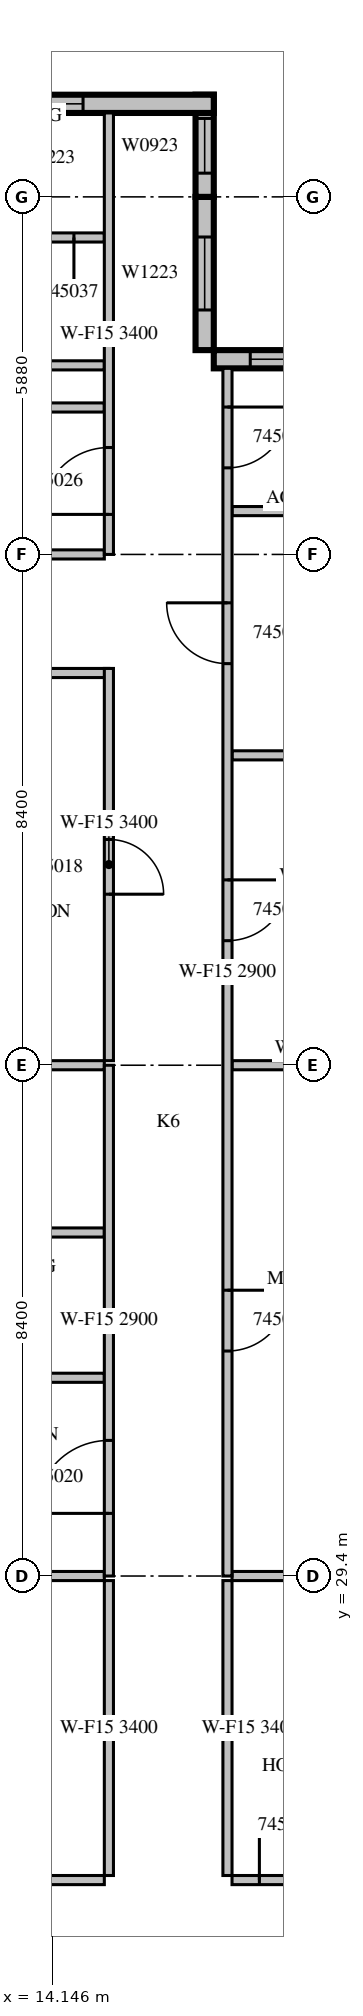
"""IFC4 building model, lengths in metres.
Left out: names, types, materials, properties, quantities, classifications, styles, units other than length and angle.
Written with IfcOpenShell. Run it as: python <this file> out.ifc"""

import sys

from ifc_helpers import new_model, si_unit, direction, frame, frame_2d, origin, place, context, subcontext, project, spatial, rectangle, extrude, source, transform, mapped, element, fill, save


model = new_model("IFC4")
c1 = context("Model", 3, precision=1e-05, world=origin(), true_north=direction((0.0, 1.0)))
c2 = subcontext(c1, "Body", "Model", "MODEL_VIEW")
j1 = project(units=[si_unit("LENGTHUNIT", "METRE"), si_unit("PLANEANGLEUNIT", "RADIAN")], contexts=[c1])
p1 = place(None, origin())
s1 = spatial("IfcSite", under=j1, at=p1, CompositionType="ELEMENT")
p2 = place(p1, origin())
s2 = spatial("IfcBuilding", under=s1, at=p2, CompositionType="ELEMENT")
p3 = place(p2, frame((0.0, 0.0, 204.4)))
s3 = spatial("IfcBuildingStorey", under=s2, at=p3, CompositionType="ELEMENT", Elevation=204.4)
m1 = source(origin(), c2, "Body", "SweptSolid", [
    extrude(rectangle(XDim=4.2, YDim=0.3, at=frame_2d((2.1, 0.0))), origin(), (0.0, 0.0, 1.0), 3.4),
])
p4 = place(p3, frame((21.0, 49.41, 0.0), z_axis=(0.0, 0.0, 1.0), x_axis=(-1.0, 0.0, 0.0)))
e1 = element("IfcWall", 1, at=p4, inside=s3, PredefinedType="STANDARD", context=c2, shape_type="MappedRepresentation", body=[
    mapped(m1, transform((0.0, 0.0, 0.0), scale=1.0)),
])
m2 = source(origin(), c2, "Body", "SweptSolid", [
    extrude(rectangle(XDim=3.0, YDim=2.3, at=frame_2d((1.5, 1.15))), frame((0.0, 0.16, 0.0), z_axis=(0.0, -1.0, 0.0), x_axis=(1.0, 0.0, 0.0)), (0.0, 0.0, 1.0), 0.32),
])
p5 = place(p4, frame((0.6, 0.0, 0.6)))
e2 = element("IfcOpeningElement", 2, at=p5, cuts=e1, PredefinedType="OPENING", context=c2, shape_type="MappedRepresentation", body=[
    mapped(m2, transform((0.0, 0.0, 0.0), scale=1.0)),
])
m3 = source(origin(), c2, "Body", "SweptSolid", [
    extrude(rectangle(XDim=2.52, YDim=0.3, at=frame_2d((1.26, 0.0))), origin(), (0.0, 0.0, 1.0), 3.4),
])
p6 = place(p3, frame((16.65, 49.56, 0.0), z_axis=(0.0, 0.0, 1.0), x_axis=(0.0, 1.0, 0.0)))
e3 = element("IfcWall", 3, at=p6, inside=s3, PredefinedType="STANDARD", context=c2, shape_type="MappedRepresentation", body=[
    mapped(m3, transform((0.0, 0.0, 0.0), scale=1.0)),
])
m4 = source(origin(), c2, "Body", "SweptSolid", [
    extrude(rectangle(XDim=1.2, YDim=2.3, at=frame_2d((0.6, 1.15))), frame((0.0, 0.16, 0.0), z_axis=(0.0, -1.0, 0.0), x_axis=(1.0, 0.0, 0.0)), (0.0, 0.0, 1.0), 0.32),
])
p7 = place(p6, frame((0.66, 0.0, 0.6)))
e4 = element("IfcOpeningElement", 4, at=p7, cuts=e3, PredefinedType="OPENING", context=c2, shape_type="MappedRepresentation", body=[
    mapped(m4, transform((0.0, 0.0, 0.0), scale=1.0)),
])
m5 = source(origin(), c2, "Body", "SweptSolid", [
    extrude(rectangle(XDim=1.68, YDim=0.3, at=frame_2d((0.84, 0.0))), origin(), (0.0, 0.0, 1.0), 3.4),
])
p8 = place(p3, frame((16.65, 52.08, 0.0), z_axis=(0.0, 0.0, 1.0), x_axis=(0.0, 1.0, 0.0)))
e5 = element("IfcWall", 5, at=p8, inside=s3, PredefinedType="STANDARD", context=c2, shape_type="MappedRepresentation", body=[
    mapped(m5, transform((0.0, 0.0, 0.0), scale=1.0)),
])
m6 = source(origin(), c2, "Body", "SweptSolid", [
    extrude(rectangle(XDim=0.9, YDim=2.3, at=frame_2d((0.45, 1.15))), frame((0.0, 0.16, 0.0), z_axis=(0.0, -1.0, 0.0), x_axis=(1.0, 0.0, 0.0)), (0.0, 0.0, 1.0), 0.32),
])
p9 = place(p8, frame((0.39, 0.0, 0.6)))
e6 = element("IfcOpeningElement", 6, at=p9, cuts=e5, PredefinedType="OPENING", context=c2, shape_type="MappedRepresentation", body=[
    mapped(m6, transform((0.0, 0.0, 0.0), scale=1.0)),
])
m7 = source(origin(), c2, "Body", "SweptSolid", [
    extrude(rectangle(XDim=10.5, YDim=0.3, at=frame_2d((5.25, 0.0))), origin(), (0.0, 0.0, 1.0), 3.4),
])
p10 = place(p3, frame((16.8, 53.61, 0.0), z_axis=(0.0, 0.0, 1.0), x_axis=(-1.0, 0.0, 0.0)))
e7 = element("IfcWall", 7, at=p10, inside=s3, PredefinedType="STANDARD", context=c2, shape_type="MappedRepresentation", body=[
    mapped(m7, transform((0.0, 0.0, 0.0), scale=1.0)),
])
p11 = place(p10, frame((2.15, 0.0, 0.6)))
e8 = element("IfcOpeningElement", 8, at=p11, cuts=e7, PredefinedType="OPENING", context=c2, shape_type="MappedRepresentation", body=[
    mapped(m4, transform((0.0, 0.0, 0.0), scale=1.0)),
])
m8 = source(origin(), c2, "Body", "SweptSolid", [
    extrude(rectangle(XDim=1.8, YDim=2.3, at=frame_2d((0.9, 1.15))), frame((0.0, 0.16, 0.0), z_axis=(0.0, -1.0, 0.0), x_axis=(1.0, 0.0, 0.0)), (0.0, 0.0, 1.0), 0.32),
])
p12 = place(p10, frame((8.025, 0.0, 0.6)))
e9 = element("IfcOpeningElement", 9, at=p12, cuts=e7, PredefinedType="OPENING", context=c2, shape_type="MappedRepresentation", body=[
    mapped(m8, transform((0.0, 0.0, 0.0), scale=1.0)),
])
m9 = source(origin(), c2, "Body", "SweptSolid", [
    extrude(rectangle(XDim=8.495, YDim=0.15, at=frame_2d((4.247, 0.0))), origin(), (0.0, 0.0, 1.0), 3.4),
])
p13 = place(p3, frame((6.505, 24.4, 0.0), z_axis=(0.0, 0.0, 1.0), x_axis=(1.0, 0.0, 0.0)))
e10 = element("IfcWall", 10, at=p13, inside=s3, PredefinedType="PARTITIONING", context=c2, shape_type="MappedRepresentation", body=[
    mapped(m9, transform((0.0, 0.0, 0.0), scale=1.0)),
])
m10 = source(origin(), c2, "Body", "SweptSolid", [
    extrude(rectangle(XDim=0.9, YDim=2.1, at=frame_2d((0.45, 1.05))), frame((0.0, 0.085, 0.0), z_axis=(0.0, -1.0, 0.0), x_axis=(1.0, 0.0, 0.0)), (0.0, 0.0, 1.0), 0.17),
])
p14 = place(p13, frame((1.045, 0.0, 0.0)))
e11 = element("IfcOpeningElement", 11, at=p14, cuts=e10, PredefinedType="OPENING", context=c2, shape_type="MappedRepresentation", body=[
    mapped(m10, transform((0.0, 0.0, 0.0), scale=1.0)),
])
p15 = place(p13, frame((6.12, 0.0, 0.0)))
e12 = element("IfcOpeningElement", 12, at=p15, cuts=e10, PredefinedType="OPENING", context=c2, shape_type="MappedRepresentation", body=[
    mapped(m10, transform((0.0, 0.0, 0.0), scale=1.0)),
])
m11 = source(origin(), c2, "Body", "SweptSolid", [
    extrude(rectangle(XDim=3.6, YDim=0.15, at=frame_2d((1.8, 0.0))), origin(), (0.0, 0.0, 1.0), 3.4),
])
p16 = place(p3, frame((17.1, 24.4, 0.0), z_axis=(0.0, 0.0, 1.0), x_axis=(1.0, 0.0, 0.0)))
e13 = element("IfcWall", 13, at=p16, inside=s3, PredefinedType="PARTITIONING", context=c2, shape_type="MappedRepresentation", body=[
    mapped(m11, transform((0.0, 0.0, 0.0), scale=1.0)),
])
p17 = place(p16, frame((0.45, 0.0, 0.0)))
e14 = element("IfcOpeningElement", 14, at=p17, cuts=e13, PredefinedType="OPENING", context=c2, shape_type="MappedRepresentation", body=[
    mapped(m10, transform((0.0, 0.0, 0.0), scale=1.0)),
])
m12 = source(origin(), c2, "Body", "SweptSolid", [
    extrude(rectangle(XDim=4.85, YDim=0.15, at=frame_2d((2.425, 0.0))), origin(), (0.0, 0.0, 1.0), 3.4),
])
for number, where, z_axis, x_axis in (
    (15, (15.075, 24.475, 0.0), (0.0, 0.0, 1.0), (0.0, 1.0, 0.0)),
    (16, (17.025, 29.325, 0.0), (0.0, 0.0, 1.0), (0.0, -1.0, 0.0)),
):
    element("IfcWall", number, at=place(p3, frame(where, z_axis=z_axis, x_axis=x_axis)), inside=s3, PredefinedType="PARTITIONING", context=c2, shape_type="MappedRepresentation", body=[
        mapped(m12, transform((0.0, 0.0, 0.0), scale=1.0)),
    ])
m13 = source(origin(), c2, "Body", "SweptSolid", [
    extrude(rectangle(XDim=4.051, YDim=0.15, at=frame_2d((2.026, 0.0))), origin(), (0.0, 0.0, 1.0), 3.4),
])
p18 = place(p3, frame((15.0, 29.4, 0.0), z_axis=(0.0, 0.0, 1.0), x_axis=(-1.0, 0.0, 0.0)))
e17 = element("IfcWall", 17, at=p18, inside=s3, PredefinedType="PARTITIONING", context=c2, shape_type="MappedRepresentation", body=[
    mapped(m13, transform((0.0, 0.0, 0.0), scale=1.0)),
])
m14 = source(origin(), c2, "Body", "SweptSolid", [
    extrude(rectangle(XDim=3.001, YDim=0.15, at=frame_2d((1.5, 0.0))), origin(), (0.0, 0.0, 1.0), 3.4),
])
p19 = place(p3, frame((20.101, 29.4, 0.0), z_axis=(0.0, 0.0, 1.0), x_axis=(-1.0, 0.0, 0.0)))
e18 = element("IfcWall", 18, at=p19, inside=s3, PredefinedType="PARTITIONING", context=c2, shape_type="MappedRepresentation", body=[
    mapped(m14, transform((0.0, 0.0, 0.0), scale=1.0)),
])
m15 = source(origin(), c2, "Body", "SweptSolid", [
    extrude(rectangle(XDim=3.975, YDim=0.15, at=frame_2d((1.988, 0.0))), origin(), (0.0, 0.0, 1.0), 3.4),
])
p20 = place(p3, frame((15.075, 44.25, 0.0), z_axis=(0.0, 0.0, 1.0), x_axis=(-1.0, 0.0, 0.0)))
e19 = element("IfcWall", 19, at=p20, inside=s3, PredefinedType="PARTITIONING", context=c2, shape_type="MappedRepresentation", body=[
    mapped(m15, transform((0.0, 0.0, 0.0), scale=1.0)),
])
m16 = source(origin(), c2, "Body", "SweptSolid", [
    extrude(rectangle(XDim=6.45, YDim=0.15, at=frame_2d((3.225, 0.0))), origin(), (0.0, 0.0, 1.0), 3.4),
])
p21 = place(p3, frame((15.075, 37.875, 0.0), z_axis=(0.0, 0.0, 1.0), x_axis=(0.0, 1.0, 0.0)))
e20 = element("IfcWall", 20, at=p21, inside=s3, PredefinedType="PARTITIONING", context=c2, shape_type="MappedRepresentation", body=[
    mapped(m16, transform((0.0, 0.0, 0.0), scale=1.0)),
])
p22 = place(p21, frame((2.737, 0.0, 0.0)))
e21 = element("IfcOpeningElement", 21, at=p22, cuts=e20, PredefinedType="OPENING", context=c2, shape_type="MappedRepresentation", body=[
    mapped(m10, transform((0.0, 0.0, 0.0), scale=1.0)),
])
m17 = source(origin(), c2, "Body", "SweptSolid", [
    extrude(rectangle(XDim=3.9, YDim=0.15, at=frame_2d((1.95, 0.0))), origin(), (0.0, 0.0, 1.0), 3.4),
])
for number, where, z_axis, x_axis in (
    (22, (15.0, 32.66, 0.0), (0.0, 0.0, 1.0), (-1.0, 0.0, 0.0)),
    (23, (15.0, 35.049, 0.0), (0.0, 0.0, 1.0), (-1.0, 0.0, 0.0)),
    (24, (15.0, 37.8, 0.0), (0.0, 0.0, 1.0), (-1.0, 0.0, 0.0)),
    (25, (15.0, 48.617, 0.0), (0.0, 0.0, 1.0), (-1.0, 0.0, 0.0)),
    (26, (15.0, 49.309, 0.0), (0.0, 0.0, 1.0), (-1.0, 0.0, 0.0)),
):
    element("IfcWall", number, at=place(p3, frame(where, z_axis=z_axis, x_axis=x_axis)), inside=s3, PredefinedType="PARTITIONING", context=c2, shape_type="MappedRepresentation", body=[
        mapped(m17, transform((0.0, 0.0, 0.0), scale=1.0)),
    ])
p23 = place(p3, frame((15.0, 51.412, 0.0), z_axis=(0.0, 0.0, 1.0), x_axis=(-1.0, 0.0, 0.0)))
e27 = element("IfcWall", 27, at=p23, inside=s3, PredefinedType="PARTITIONING", context=c2, shape_type="MappedRepresentation", body=[
    mapped(m17, transform((0.0, 0.0, 0.0), scale=1.0)),
])
p24 = place(p23, frame((1.5, 0.0, 0.0)))
e28 = element("IfcOpeningElement", 28, at=p24, cuts=e27, PredefinedType="OPENING", context=c2, shape_type="MappedRepresentation", body=[
    mapped(m10, transform((0.0, 0.0, 0.0), scale=1.0)),
])
p25 = place(p23, frame((0.5, 0.0, 0.0)))
e29 = element("IfcOpeningElement", 29, at=p25, cuts=e27, PredefinedType="OPENING", context=c2, shape_type="MappedRepresentation", body=[
    mapped(m10, transform((0.0, 0.0, 0.0), scale=1.0)),
])
p26 = place(p23, frame((2.5, 0.0, 0.0)))
e30 = element("IfcOpeningElement", 30, at=p26, cuts=e27, PredefinedType="OPENING", context=c2, shape_type="MappedRepresentation", body=[
    mapped(m10, transform((0.0, 0.0, 0.0), scale=1.0)),
])
p27 = place(p3, frame((15.0, 46.2, 0.0), z_axis=(0.0, 0.0, 1.0), x_axis=(-1.0, 0.0, 0.0)))
e31 = element("IfcWall", 31, at=p27, inside=s3, PredefinedType="PARTITIONING", context=c2, shape_type="MappedRepresentation", body=[
    mapped(m17, transform((0.0, 0.0, 0.0), scale=1.0)),
])
for number, where, z_axis, x_axis in (
    (32, (17.1, 42.896, 0.0), (0.0, 0.0, 1.0), (1.0, 0.0, 0.0)),
    (33, (17.1, 46.913, 0.0), (0.0, 0.0, 1.0), (1.0, 0.0, 0.0)),
):
    element("IfcWall", number, at=place(p3, frame(where, z_axis=z_axis, x_axis=x_axis)), inside=s3, PredefinedType="PARTITIONING", context=c2, shape_type="MappedRepresentation", body=[
        mapped(m11, transform((0.0, 0.0, 0.0), scale=1.0)),
    ])
p28 = place(p3, frame((20.101, 37.8, 0.0), z_axis=(0.0, 0.0, 1.0), x_axis=(-1.0, 0.0, 0.0)))
e34 = element("IfcWall", 34, at=p28, inside=s3, PredefinedType="PARTITIONING", context=c2, shape_type="MappedRepresentation", body=[
    mapped(m14, transform((0.0, 0.0, 0.0), scale=1.0)),
])
m18 = source(origin(), c2, "Body", "SweptSolid", [
    extrude(rectangle(XDim=8.4, YDim=0.15, at=frame_2d((4.2, 0.0))), origin(), (0.0, 0.0, 1.0), 2.9),
])
p29 = place(p3, frame((15.075, 29.4, 0.0), z_axis=(0.0, 0.0, 1.0), x_axis=(0.0, 1.0, 0.0)))
e35 = element("IfcWall", 35, at=p29, inside=s3, PredefinedType="PARTITIONING", context=c2, shape_type="MappedRepresentation", body=[
    mapped(m18, transform((0.0, 0.0, 0.0), scale=1.0)),
])
m19 = source(origin(), c2, "Body", "SweptSolid", [
    extrude(rectangle(XDim=1.2, YDim=2.1, at=frame_2d((0.6, 1.05))), frame((0.0, 0.085, 0.0), z_axis=(0.0, -1.0, 0.0), x_axis=(1.0, 0.0, 0.0)), (0.0, 0.0, 1.0), 0.17),
])
p30 = place(p29, frame((1.03, 0.0, 0.0)))
e36 = element("IfcOpeningElement", 36, at=p30, cuts=e35, PredefinedType="OPENING", context=c2, shape_type="MappedRepresentation", body=[
    mapped(m19, transform((0.0, 0.0, 0.0), scale=1.0)),
])
m20 = source(origin(), c2, "Body", "SweptSolid", [
    extrude(rectangle(XDim=7.26, YDim=0.15, at=frame_2d((3.63, 0.0))), origin(), (0.0, 0.0, 1.0), 3.4),
])
p31 = place(p3, frame((15.075, 46.2, 0.0), z_axis=(0.0, 0.0, 1.0), x_axis=(0.0, 1.0, 0.0)))
e37 = element("IfcWall", 37, at=p31, inside=s3, PredefinedType="PARTITIONING", context=c2, shape_type="MappedRepresentation", body=[
    mapped(m20, transform((0.0, 0.0, 0.0), scale=1.0)),
])
m21 = source(origin(), c2, "Body", "SweptSolid", [
    extrude(rectangle(XDim=1.1, YDim=2.1, at=frame_2d((0.55, 1.05))), frame((0.0, 0.085, 0.0), z_axis=(0.0, -1.0, 0.0), x_axis=(1.0, 0.0, 0.0)), (0.0, 0.0, 1.0), 0.17),
])
p32 = place(p31, frame((0.658, 0.0, 0.0)))
e38 = element("IfcOpeningElement", 38, at=p32, cuts=e37, PredefinedType="OPENING", context=c2, shape_type="MappedRepresentation", body=[
    mapped(m21, transform((0.0, 0.0, 0.0), scale=1.0)),
])
m22 = source(origin(), c2, "Body", "SweptSolid", [
    extrude(rectangle(XDim=19.86, YDim=0.15, at=frame_2d((9.93, 0.0))), origin(), (0.0, 0.0, 1.0), 2.9),
])
p33 = place(p3, frame((17.025, 49.26, 0.0), z_axis=(0.0, 0.0, 1.0), x_axis=(0.0, -1.0, 0.0)))
e39 = element("IfcWall", 39, at=p33, inside=s3, PredefinedType="PARTITIONING", context=c2, shape_type="MappedRepresentation", body=[
    mapped(m22, transform((0.0, 0.0, 0.0), scale=1.0)),
])
m23 = source(origin(), c2, "Body", "SweptSolid", [
    extrude(rectangle(XDim=1.0, YDim=2.1, at=frame_2d((0.5, 1.05))), frame((0.0, 0.085, 0.0), z_axis=(0.0, -1.0, 0.0), x_axis=(1.0, 0.0, 0.0)), (0.0, 0.0, 1.0), 0.17),
])
p34 = place(p33, frame((15.16, 0.0, 0.0)))
e40 = element("IfcOpeningElement", 40, at=p34, cuts=e39, PredefinedType="OPENING", context=c2, shape_type="MappedRepresentation", body=[
    mapped(m23, transform((0.0, 0.0, 0.0), scale=1.0)),
])
p35 = place(p33, frame((8.412, 0.0, 0.0)))
e41 = element("IfcOpeningElement", 41, at=p35, cuts=e39, PredefinedType="OPENING", context=c2, shape_type="MappedRepresentation", body=[
    mapped(m23, transform((0.0, 0.0, 0.0), scale=1.0)),
])
p36 = place(p33, frame((3.856, 0.0, 0.0)))
e42 = element("IfcOpeningElement", 42, at=p36, cuts=e39, PredefinedType="OPENING", context=c2, shape_type="MappedRepresentation", body=[
    mapped(m23, transform((0.0, 0.0, 0.0), scale=1.0)),
])
p37 = place(p33, frame((0.636, 0.0, 0.0)))
e43 = element("IfcOpeningElement", 43, at=p37, cuts=e39, PredefinedType="OPENING", context=c2, shape_type="MappedRepresentation", body=[
    mapped(m23, transform((0.0, 0.0, 0.0), scale=1.0)),
])
m24 = source(origin(), c2, "Body", "SweptSolid", [
    extrude(rectangle(XDim=3.0, YDim=2.3, at=frame_2d((1.5, 1.15))), frame((0.0, 0.03, 0.0), z_axis=(0.0, -1.0, 0.0), x_axis=(1.0, 0.0, 0.0)), (0.0, 0.0, 1.0), 0.06),
])
p38 = place(p5, origin())
e44 = element("IfcWindow", 44, at=p38, inside=s3, PartitioningType="SINGLE_PANEL", PredefinedType="WINDOW", context=c2, shape_type="MappedRepresentation", body=[
    mapped(m24, transform((0.0, 0.0, 0.0), scale=1.0)),
])
fill(e2, e44)
m25 = source(origin(), c2, "Body", "SweptSolid", [
    extrude(rectangle(XDim=1.2, YDim=2.3, at=frame_2d((0.6, 1.15))), frame((0.0, 0.03, 0.0), z_axis=(0.0, -1.0, 0.0), x_axis=(1.0, 0.0, 0.0)), (0.0, 0.0, 1.0), 0.06),
])
p39 = place(p7, origin())
e45 = element("IfcWindow", 45, at=p39, inside=s3, PartitioningType="SINGLE_PANEL", PredefinedType="WINDOW", context=c2, shape_type="MappedRepresentation", body=[
    mapped(m25, transform((0.0, 0.0, 0.0), scale=1.0)),
])
fill(e4, e45)
m26 = source(origin(), c2, "Body", "SweptSolid", [
    extrude(rectangle(XDim=0.9, YDim=2.3, at=frame_2d((0.45, 1.15))), frame((0.0, 0.03, 0.0), z_axis=(0.0, -1.0, 0.0), x_axis=(1.0, 0.0, 0.0)), (0.0, 0.0, 1.0), 0.06),
])
p40 = place(p9, origin())
e46 = element("IfcWindow", 46, at=p40, inside=s3, PartitioningType="SINGLE_PANEL", PredefinedType="WINDOW", context=c2, shape_type="MappedRepresentation", body=[
    mapped(m26, transform((0.0, 0.0, 0.0), scale=1.0)),
])
fill(e6, e46)
p41 = place(p11, origin())
e47 = element("IfcWindow", 47, at=p41, inside=s3, PartitioningType="SINGLE_PANEL", PredefinedType="WINDOW", context=c2, shape_type="MappedRepresentation", body=[
    mapped(m25, transform((0.0, 0.0, 0.0), scale=1.0)),
])
fill(e8, e47)
m27 = source(origin(), c2, "Body", "SweptSolid", [
    extrude(rectangle(XDim=0.9, YDim=2.1, at=frame_2d((0.45, 1.05))), frame((0.0, 0.025, 0.0), z_axis=(0.0, -1.0, 0.0), x_axis=(1.0, 0.0, 0.0)), (0.0, 0.0, 1.0), 0.05),
])
p42 = place(p17, origin())
e48 = element("IfcDoor", 48, at=p42, inside=s3, OperationType="SINGLE_SWING_LEFT", PredefinedType="DOOR", context=c2, shape_type="MappedRepresentation", body=[
    mapped(m27, transform((0.0, 0.0, 0.0), scale=1.0)),
])
fill(e14, e48)
p43 = place(p22, origin())
e49 = element("IfcDoor", 49, at=p43, inside=s3, OperationType="SINGLE_SWING_RIGHT", PredefinedType="DOOR", context=c2, shape_type="MappedRepresentation", body=[
    mapped(m27, transform((0.0, 0.0, 0.0), scale=1.0)),
])
fill(e21, e49)
m28 = source(origin(), c2, "Body", "SweptSolid", [
    extrude(rectangle(XDim=1.2, YDim=2.1, at=frame_2d((0.6, 1.05))), frame((0.0, 0.025, 0.0), z_axis=(0.0, -1.0, 0.0), x_axis=(1.0, 0.0, 0.0)), (0.0, 0.0, 1.0), 0.05),
])
p44 = place(p30, origin())
e50 = element("IfcDoor", 50, at=p44, inside=s3, OperationType="SINGLE_SWING_LEFT", PredefinedType="DOOR", context=c2, shape_type="MappedRepresentation", body=[
    mapped(m28, transform((0.0, 0.0, 0.0), scale=1.0)),
])
fill(e36, e50)
m29 = source(origin(), c2, "Body", "SweptSolid", [
    extrude(rectangle(XDim=1.1, YDim=2.1, at=frame_2d((0.55, 1.05))), frame((0.0, 0.025, 0.0), z_axis=(0.0, -1.0, 0.0), x_axis=(1.0, 0.0, 0.0)), (0.0, 0.0, 1.0), 0.05),
])
p45 = place(p32, origin())
e51 = element("IfcDoor", 51, at=p45, inside=s3, OperationType="SINGLE_SWING_LEFT", PredefinedType="DOOR", context=c2, shape_type="MappedRepresentation", body=[
    mapped(m29, transform((0.0, 0.0, 0.0), scale=1.0)),
])
fill(e38, e51)
m30 = source(origin(), c2, "Body", "SweptSolid", [
    extrude(rectangle(XDim=1.0, YDim=2.1, at=frame_2d((0.5, 1.05))), frame((0.0, 0.025, 0.0), z_axis=(0.0, -1.0, 0.0), x_axis=(1.0, 0.0, 0.0)), (0.0, 0.0, 1.0), 0.05),
])
p46 = place(p34, origin())
e52 = element("IfcDoor", 52, at=p46, inside=s3, OperationType="SINGLE_SWING_LEFT", PredefinedType="DOOR", context=c2, shape_type="MappedRepresentation", body=[
    mapped(m30, transform((0.0, 0.0, 0.0), scale=1.0)),
])
fill(e40, e52)
p47 = place(p35, origin())
e53 = element("IfcDoor", 53, at=p47, inside=s3, OperationType="SINGLE_SWING_LEFT", PredefinedType="DOOR", context=c2, shape_type="MappedRepresentation", body=[
    mapped(m30, transform((0.0, 0.0, 0.0), scale=1.0)),
])
fill(e41, e53)
p48 = place(p36, origin())
e54 = element("IfcDoor", 54, at=p48, inside=s3, OperationType="SINGLE_SWING_RIGHT", PredefinedType="DOOR", context=c2, shape_type="MappedRepresentation", body=[
    mapped(m30, transform((0.0, 0.0, 0.0), scale=1.0)),
])
fill(e42, e54)
p49 = place(p37, origin())
e55 = element("IfcDoor", 55, at=p49, inside=s3, OperationType="SINGLE_SWING_LEFT", PredefinedType="DOOR", context=c2, shape_type="MappedRepresentation", body=[
    mapped(m30, transform((0.0, 0.0, 0.0), scale=1.0)),
])
fill(e43, e55)
p50 = place(p25, origin())
e56 = element("IfcDoor", 56, at=p50, inside=s3, OperationType="SINGLE_SWING_LEFT", PredefinedType="DOOR", context=c2, shape_type="MappedRepresentation", body=[
    mapped(m27, transform((0.0, 0.0, 0.0), scale=1.0)),
])
fill(e29, e56)
save(model, sys.argv[1])
